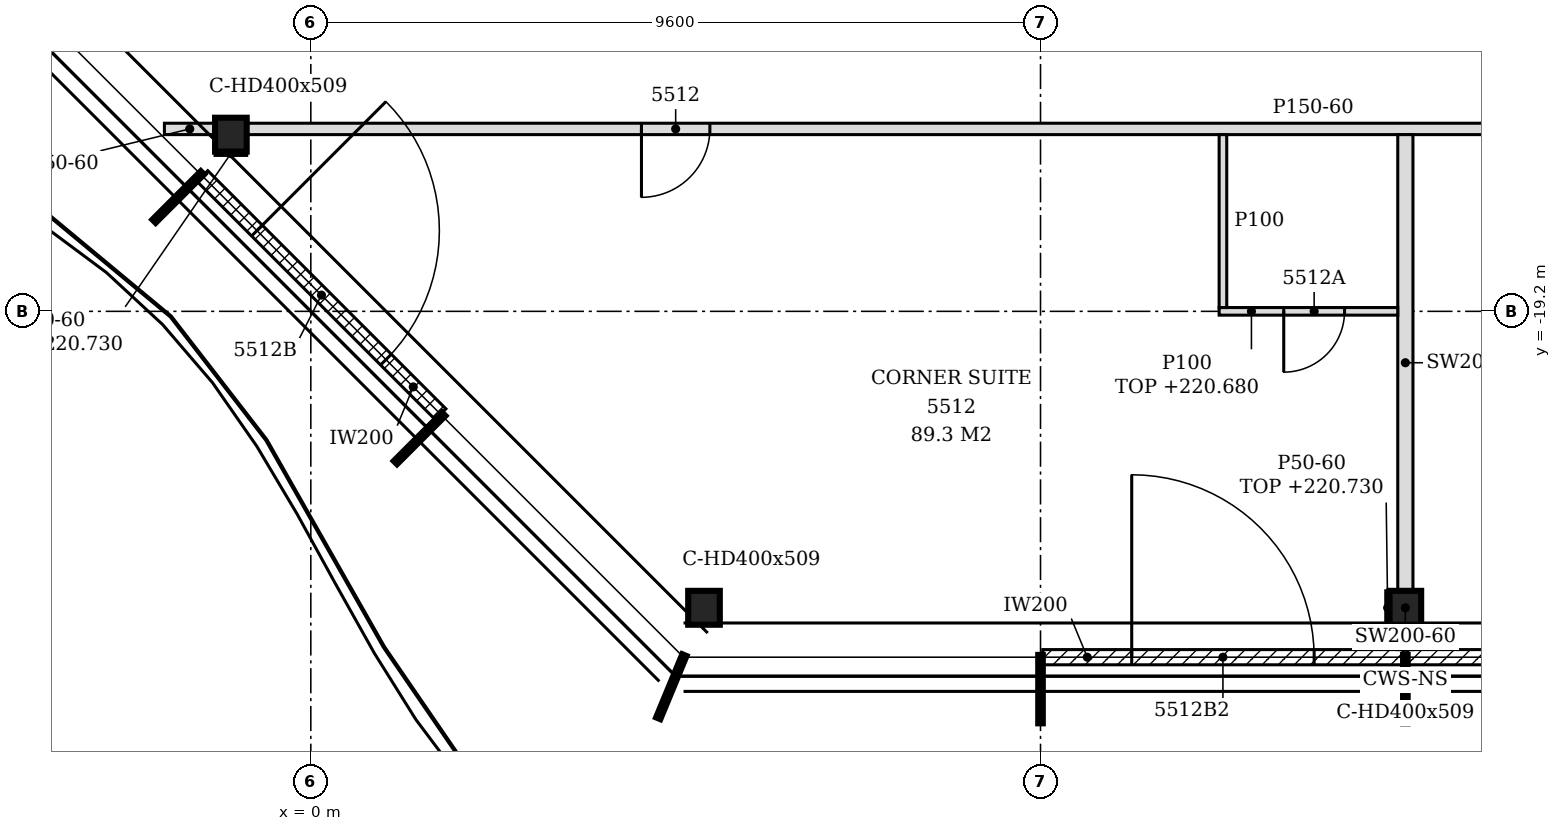
"""IFC4 building model, lengths in metres.
Left out: names, types, materials, properties, quantities, classifications, styles, units other than length and angle.
Written with IfcOpenShell. Run it as: python <this file> out.ifc"""

import sys

from ifc_helpers import new_model, si_unit, direction, frame, frame_2d, origin, origin_2d, place, context, subcontext, project, spatial, polyline, rectangle, i_section, outline, extrude, element, fill, save


model = new_model("IFC4")
c1 = context("Model", 3, precision=1e-05, world=origin(), true_north=direction((0.0, 1.0)))
c2 = subcontext(c1, "Body", "Model", "MODEL_VIEW")
j1 = project(units=[si_unit("LENGTHUNIT", "METRE"), si_unit("PLANEANGLEUNIT", "RADIAN")], contexts=[c1])
p1 = place(None, origin())
s1 = spatial("IfcSite", under=j1, at=p1, CompositionType="ELEMENT")
p2 = place(p1, origin())
s2 = spatial("IfcBuilding", under=s1, at=p2, CompositionType="ELEMENT")
p3 = place(p2, frame((0.0, 0.0, 217.8)))
s3 = spatial("IfcBuildingStorey", under=s2, at=p3, CompositionType="ELEMENT", Elevation=217.8)
for number, where, z_axis, x_axis in (
    (1, (5.173, -23.1, -0.15), (0.0, 0.0, 1.0), (1.0, 0.0, 0.0)),
    (2, (14.4, -23.1, -0.15), (0.0, 0.0, 1.0), (1.0, 0.0, 0.0)),
    (3, (-1.052, -16.876, -0.15), (0.0, 0.0, 1.0), (1.0, 0.0, 0.0)),
):
    element("IfcColumn", number, at=place(p3, frame(where, z_axis=z_axis, x_axis=x_axis)), inside=s3, PredefinedType="COLUMN", context=c2, shape_type="SweptSolid", body=[
        extrude(i_section(OverallWidth=0.416, OverallDepth=0.446, WebThickness=0.039, FlangeThickness=0.063, FilletRadius=0.015, at=origin_2d()), origin(), (0.0, 0.0, 1.0), 3.6),
    ])
p4 = place(p3, frame((9.63, -23.75, 0.0), z_axis=(0.0, 0.0, 1.0), x_axis=(1.0, 0.0, 0.0)))
e4 = element("IfcWall", 4, at=p4, inside=s3, PredefinedType="NOTDEFINED", context=c2, shape_type="SweptSolid", body=[
    extrude(rectangle(XDim=4.74, YDim=0.2, at=frame_2d((2.37, 0.0))), origin(), (0.0, 0.0, 1.0), 3.45),
])
p5 = place(p4, frame((1.17, 0.0, 0.0)))
e5 = element("IfcOpeningElement", 5, at=p5, cuts=e4, PredefinedType="OPENING", context=c2, shape_type="SweptSolid", body=[
    extrude(rectangle(XDim=2.4, YDim=2.4, at=frame_2d((1.2, 1.2))), frame((0.0, 0.11, 0.0), z_axis=(0.0, -1.0, 0.0), x_axis=(1.0, 0.0, 0.0)), (0.0, 0.0, 1.0), 0.22),
])
p6 = place(p3, frame((14.43, -23.75, 0.0), z_axis=(0.0, 0.0, 1.0), x_axis=(1.0, 0.0, 0.0)))
e6 = element("IfcWall", 6, at=p6, inside=s3, PredefinedType="NOTDEFINED", context=c2, shape_type="SweptSolid", body=[
    extrude(rectangle(XDim=4.74, YDim=0.2, at=frame_2d((2.37, 0.0))), origin(), (0.0, 0.0, 1.0), 3.45),
])
p7 = place(p6, frame((1.17, 0.0, 0.0)))
e7 = element("IfcOpeningElement", 7, at=p7, cuts=e6, PredefinedType="OPENING", context=c2, shape_type="SweptSolid", body=[
    extrude(rectangle(XDim=2.4, YDim=2.4, at=frame_2d((1.2, 1.2))), frame((0.0, 0.11, 0.0), z_axis=(0.0, -1.0, 0.0), x_axis=(1.0, 0.0, 0.0)), (0.0, 0.0, 1.0), 0.22),
])
p8 = place(p3, frame((-1.427, -17.42, 0.0), z_axis=(0.0, 0.0, 1.0), x_axis=(0.707106781187, -0.707106781187, 0.0)))
e8 = element("IfcWall", 8, at=p8, inside=s3, PredefinedType="NOTDEFINED", context=c2, shape_type="SweptSolid", body=[
    extrude(rectangle(XDim=4.431, YDim=0.2, at=frame_2d((2.216, 0.0))), origin(), (0.0, 0.0, 1.0), 3.45),
])
p9 = place(p8, frame((1.015, 0.0, 0.0)))
e9 = element("IfcOpeningElement", 9, at=p9, cuts=e8, PredefinedType="OPENING", context=c2, shape_type="SweptSolid", body=[
    extrude(rectangle(XDim=2.4, YDim=2.4, at=frame_2d((1.2, 1.2))), frame((0.0, 0.11, 0.0), z_axis=(0.0, -1.0, 0.0), x_axis=(1.0, 0.0, 0.0)), (0.0, 0.0, 1.0), 0.22),
])
p10 = place(p3, frame((14.4, -23.65, 0.0), z_axis=(0.0, 0.0, 1.0), x_axis=(0.0, 1.0, 0.0)))
e10 = element("IfcWall", 10, at=p10, inside=s3, PredefinedType="PARTITIONING", context=c2, shape_type="SweptSolid", body=[
    extrude(rectangle(XDim=0.327, YDim=0.2, at=frame_2d((0.164, 0.0))), origin(), (0.0, 0.0, 1.0), 3.45),
])
p11 = place(p3, frame((14.4, -22.877, 0.0), z_axis=(0.0, 0.0, 1.0), x_axis=(0.0, 1.0, 0.0)))
e11 = element("IfcWall", 11, at=p11, inside=s3, PredefinedType="PARTITIONING", context=c2, shape_type="SweptSolid", body=[
    extrude(outline(polyline([(0.0, 0.0), (6.002, 0.0), (6.002, 3.45), (3.782, 3.45), (3.78, 2.88), (3.572, 2.88), (3.57, 3.45), (0.0, 3.45), (0.0, 0.0)])), frame((0.0, 0.1, 0.0), z_axis=(0.0, -1.0, 0.0), x_axis=(1.0, 0.0, 0.0)), (0.0, 0.0, 1.0), 0.2),
])
p12 = place(p3, frame((11.95, -19.2, 0.0), z_axis=(0.0, 0.0, 1.0), x_axis=(1.0, 0.0, 0.0)))
e12 = element("IfcWall", 12, at=p12, inside=s3, PredefinedType="PARTITIONING", context=c2, shape_type="SweptSolid", body=[
    extrude(rectangle(XDim=2.35, YDim=0.1, at=frame_2d((1.175, 0.0))), origin(), (0.0, 0.0, 1.0), 2.88),
])
p13 = place(p12, frame((0.85, 0.0, 0.0)))
e13 = element("IfcOpeningElement", 13, at=p13, cuts=e12, PredefinedType="OPENING", context=c2, shape_type="SweptSolid", body=[
    extrude(rectangle(XDim=0.8, YDim=2.1, at=frame_2d((0.4, 1.05))), frame((0.0, 0.06, 0.0), z_axis=(0.0, -1.0, 0.0), x_axis=(1.0, 0.0, 0.0)), (0.0, 0.0, 1.0), 0.12),
])
p14 = place(p3, frame((12.0, -19.15, 0.0), z_axis=(0.0, 0.0, 1.0), x_axis=(0.0, 1.0, 0.0)))
e14 = element("IfcWall", 14, at=p14, inside=s3, PredefinedType="PARTITIONING", context=c2, shape_type="SweptSolid", body=[
    extrude(outline(polyline([(0.0, 0.0), (2.275, 0.0), (2.275, 3.45), (0.055, 3.45), (0.053, 2.88), (0.0, 2.88), (0.0, 0.0)])), frame((0.0, 0.05, 0.0), z_axis=(0.0, -1.0, 0.0), x_axis=(1.0, 0.0, 0.0)), (0.0, 0.0, 1.0), 0.1),
])
p15 = place(p3, frame((-1.926, -16.8, 0.0), z_axis=(0.0, 0.0, 1.0), x_axis=(1.0, 0.0, 0.0)))
e15 = element("IfcWall", 15, at=p15, inside=s3, PredefinedType="PARTITIONING", context=c2, shape_type="SweptSolid", body=[
    extrude(outline(polyline([(0.0, 0.0), (0.667, 0.0), (0.667, 2.63), (0.229, 2.63), (0.227, 3.45), (0.0, 3.45), (0.0, 0.0)])), frame((0.0, 0.075, 0.0), z_axis=(0.0, -1.0, 0.0), x_axis=(1.0, 0.0, 0.0)), (0.0, 0.0, 1.0), 0.15),
])
p16 = place(p3, frame((-0.844, -16.8, 0.0), z_axis=(0.0, 0.0, 1.0), x_axis=(1.0, 0.0, 0.0)))
e16 = element("IfcWall", 16, at=p16, inside=s3, PredefinedType="PARTITIONING", context=c2, shape_type="SweptSolid", body=[
    extrude(outline(polyline([(0.0, 0.0), (21.968, 0.0), (21.968, 3.45), (20.194, 3.45), (20.191, 2.73), (19.894, 2.73), (19.892, 3.45), (8.194, 3.45), (8.191, 2.73), (7.894, 2.73), (7.892, 3.45), (0.0, 3.45), (0.0, 0.0)])), frame((0.0, 0.075, 0.0), z_axis=(0.0, -1.0, 0.0), x_axis=(1.0, 0.0, 0.0)), (0.0, 0.0, 1.0), 0.15),
])
p17 = place(p16, frame((5.194, 0.0, 0.0)))
e17 = element("IfcOpeningElement", 17, at=p17, cuts=e16, PredefinedType="OPENING", context=c2, shape_type="SweptSolid", body=[
    extrude(rectangle(XDim=0.9, YDim=2.1, at=frame_2d((0.45, 1.05))), frame((0.0, 0.085, 0.0), z_axis=(0.0, -1.0, 0.0), x_axis=(1.0, 0.0, 0.0)), (0.0, 0.0, 1.0), 0.17),
])
p18 = place(p3, frame((14.167, -23.323, 0.0), z_axis=(0.0, 0.0, 1.0), x_axis=(0.0, 1.0, 0.0)))
e18 = element("IfcWall", 18, at=p18, inside=s3, PredefinedType="PARTITIONING", context=c2, shape_type="SweptSolid", body=[
    extrude(rectangle(XDim=0.446, YDim=0.05, at=frame_2d((0.223, 0.0))), origin(), (0.0, 0.0, 1.0), 2.93),
])
p19 = place(p3, frame((-1.26, -17.124, 0.0), z_axis=(0.0, 0.0, 1.0), x_axis=(1.0, 0.0, 0.0)))
e19 = element("IfcWall", 19, at=p19, inside=s3, PredefinedType="PARTITIONING", context=c2, shape_type="SweptSolid", body=[
    extrude(rectangle(XDim=0.416, YDim=0.05, at=frame_2d((0.208, 0.0))), origin(), (0.0, 0.0, 1.0), 2.93),
])
p20 = place(p5, origin())
e20 = element("IfcDoor", 20, at=p20, inside=s3, OperationType="SINGLE_SWING_LEFT", PredefinedType="DOOR", context=c2, shape_type="SweptSolid", body=[
    extrude(rectangle(XDim=2.4, YDim=2.4, at=frame_2d((1.2, 1.2))), frame((0.0, 0.025, 0.0), z_axis=(0.0, -1.0, 0.0), x_axis=(1.0, 0.0, 0.0)), (0.0, 0.0, 1.0), 0.05),
])
fill(e5, e20)
p21 = place(p9, origin())
e21 = element("IfcDoor", 21, at=p21, inside=s3, OperationType="SINGLE_SWING_LEFT", PredefinedType="DOOR", context=c2, shape_type="SweptSolid", body=[
    extrude(rectangle(XDim=2.4, YDim=2.4, at=frame_2d((1.2, 1.2))), frame((0.0, 0.025, 0.0), z_axis=(0.0, -1.0, 0.0), x_axis=(1.0, 0.0, 0.0)), (0.0, 0.0, 1.0), 0.05),
])
fill(e9, e21)
p22 = place(p17, frame((0.9, 0.0, 0.0), z_axis=(0.0, 0.0, 1.0), x_axis=(-1.0, 0.0, 0.0)))
e22 = element("IfcDoor", 22, at=p22, inside=s3, OperationType="SINGLE_SWING_RIGHT", PredefinedType="DOOR", context=c2, shape_type="SweptSolid", body=[
    extrude(rectangle(XDim=0.9, YDim=2.1, at=frame_2d((0.45, 1.05))), frame((0.0, 0.025, 0.0), z_axis=(0.0, -1.0, 0.0), x_axis=(1.0, 0.0, 0.0)), (0.0, 0.0, 1.0), 0.05),
])
fill(e17, e22)
p23 = place(p13, frame((0.8, 0.0, 0.0), z_axis=(0.0, 0.0, 1.0), x_axis=(-1.0, 0.0, 0.0)))
e23 = element("IfcDoor", 23, at=p23, inside=s3, OperationType="SINGLE_SWING_RIGHT", PredefinedType="DOOR", context=c2, shape_type="SweptSolid", body=[
    extrude(rectangle(XDim=0.8, YDim=2.1, at=frame_2d((0.4, 1.05))), frame((0.0, 0.025, 0.0), z_axis=(0.0, -1.0, 0.0), x_axis=(1.0, 0.0, 0.0)), (0.0, 0.0, 1.0), 0.05),
])
fill(e13, e23)
save(model, sys.argv[1])
